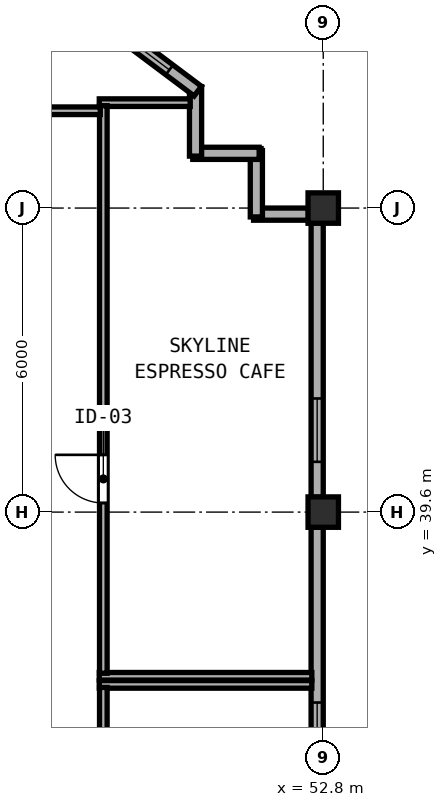
"""IFC4 building model, lengths in metres.
Left out: names, types, materials, properties, quantities, classifications, styles, units other than length and angle.
Written with IfcOpenShell. Run it as: python <this file> out.ifc"""

import sys

from ifc_helpers import new_model, si_unit, direction, frame, frame_2d, origin, origin_2d, place, context, subcontext, project, spatial, rectangle, hollow_rectangle, extrude, element, fill, save


model = new_model("IFC4")
c1 = context("Model", 3, precision=1e-05, world=origin(), true_north=direction((0.0, 1.0)))
c2 = subcontext(c1, "Body", "Model", "MODEL_VIEW")
j1 = project(units=[si_unit("LENGTHUNIT", "METRE"), si_unit("PLANEANGLEUNIT", "RADIAN")], contexts=[c1])
p1 = place(None, origin())
s1 = spatial("IfcSite", under=j1, at=p1, CompositionType="ELEMENT")
p2 = place(p1, origin())
s2 = spatial("IfcBuilding", under=s1, at=p2, CompositionType="ELEMENT")
p3 = place(p2, frame((0.0, 0.0, 318.2)))
s3 = spatial("IfcBuildingStorey", under=s2, at=p3, CompositionType="ELEMENT", Elevation=318.2)
for number, where, z_axis, x_axis in (
    (1, (52.8, 45.6, 0.0), (0.0, 0.0, 1.0), (1.0, 0.0, 0.0)),
    (2, (52.8, 39.6, 0.0), (0.0, 0.0, 1.0), (1.0, 0.0, 0.0)),
):
    element("IfcColumn", number, at=place(p3, frame(where, z_axis=z_axis, x_axis=x_axis)), inside=s3, PredefinedType="COLUMN", context=c2, shape_type="SweptSolid", body=[
        extrude(hollow_rectangle(XDim=0.6, YDim=0.6, WallThickness=0.024, at=origin_2d()), origin(), (0.0, 0.0, 1.0), 5.0),
    ])
p4 = place(p3, frame((52.68, 33.892, 0.0), z_axis=(0.0, 0.0, 1.0), x_axis=(0.0, 1.0, 0.0)))
e3 = element("IfcWall", 3, at=p4, inside=s3, PredefinedType="SOLIDWALL", context=c2, shape_type="SweptSolid", body=[
    extrude(rectangle(XDim=5.416, YDim=0.24, at=frame_2d((2.708, 0.0))), origin(), (0.0, 0.0, 1.0), 4.355),
])
p5 = place(p4, frame((0.7, 0.0, 0.85)))
e4 = element("IfcOpeningElement", 4, at=p5, cuts=e3, PredefinedType="OPENING", context=c2, shape_type="SweptSolid", body=[
    extrude(rectangle(XDim=1.25, YDim=1.95, at=frame_2d((0.625, 0.975))), frame((0.0, 0.13, 0.0), z_axis=(0.0, -1.0, 0.0), x_axis=(1.0, 0.0, 0.0)), (0.0, 0.0, 1.0), 0.26),
])
p6 = place(p3, frame((52.68, 39.892, 0.0), z_axis=(0.0, 0.0, 1.0), x_axis=(0.0, 1.0, 0.0)))
e5 = element("IfcWall", 5, at=p6, inside=s3, PredefinedType="SOLIDWALL", context=c2, shape_type="SweptSolid", body=[
    extrude(rectangle(XDim=5.416, YDim=0.24, at=frame_2d((2.708, 0.0))), origin(), (0.0, 0.0, 1.0), 4.355),
])
p7 = place(p6, frame((0.7, 0.0, 0.85)))
e6 = element("IfcOpeningElement", 6, at=p7, cuts=e5, PredefinedType="OPENING", context=c2, shape_type="SweptSolid", body=[
    extrude(rectangle(XDim=1.25, YDim=1.95, at=frame_2d((0.625, 0.975))), frame((0.0, 0.13, 0.0), z_axis=(0.0, -1.0, 0.0), x_axis=(1.0, 0.0, 0.0)), (0.0, 0.0, 1.0), 0.26),
])
p8 = place(p3, frame((52.508, 45.48, 0.0), z_axis=(0.0, 0.0, 1.0), x_axis=(-1.0, 0.0, 0.0)))
e7 = element("IfcWall", 7, at=p8, inside=s3, PredefinedType="SOLIDWALL", context=c2, shape_type="SweptSolid", body=[
    extrude(rectangle(XDim=1.083, YDim=0.24, at=frame_2d((0.542, 0.0))), origin(), (0.0, 0.0, 1.0), 4.76),
])
p9 = place(p3, frame((51.48, 45.425, 0.0), z_axis=(0.0, 0.0, 1.0), x_axis=(0.0, 1.0, 0.0)))
e8 = element("IfcWall", 8, at=p9, inside=s3, PredefinedType="SOLIDWALL", context=c2, shape_type="SweptSolid", body=[
    extrude(rectangle(XDim=1.31, YDim=0.24, at=frame_2d((0.655, 0.0))), origin(), (0.0, 0.0, 1.0), 4.76),
])
p10 = place(p3, frame((51.535, 46.68, 0.0), z_axis=(0.0, 0.0, 1.0), x_axis=(-1.0, 0.0, 0.0)))
e9 = element("IfcWall", 9, at=p10, inside=s3, PredefinedType="SOLIDWALL", context=c2, shape_type="SweptSolid", body=[
    extrude(rectangle(XDim=1.31, YDim=0.24, at=frame_2d((0.655, 0.0))), origin(), (0.0, 0.0, 1.0), 4.76),
])
p11 = place(p3, frame((50.28, 46.625, 0.0), z_axis=(0.0, 0.0, 1.0), x_axis=(0.0, 1.0, 0.0)))
e10 = element("IfcWall", 10, at=p11, inside=s3, PredefinedType="SOLIDWALL", context=c2, shape_type="SweptSolid", body=[
    extrude(rectangle(XDim=1.37, YDim=0.24, at=frame_2d((0.685, 0.0))), origin(), (0.0, 0.0, 1.0), 4.76),
])
p12 = place(p3, frame((50.324, 47.907, 0.0), z_axis=(0.0, 0.0, 1.0), x_axis=(-0.80001459783, 0.599980535734, 0.0)))
e11 = element("IfcWall", 11, at=p12, inside=s3, PredefinedType="SOLIDWALL", context=c2, shape_type="SweptSolid", body=[
    extrude(rectangle(XDim=6.021, YDim=0.24, at=frame_2d((3.01, 0.0))), origin(), (0.0, 0.0, 1.0), 4.76),
])
p13 = place(p12, frame((0.7, 0.0, 0.85)))
e12 = element("IfcOpeningElement", 12, at=p13, cuts=e11, PredefinedType="OPENING", context=c2, shape_type="SweptSolid", body=[
    extrude(rectangle(XDim=1.25, YDim=1.95, at=frame_2d((0.625, 0.975))), frame((0.0, 0.13, 0.0), z_axis=(0.0, -1.0, 0.0), x_axis=(1.0, 0.0, 0.0)), (0.0, 0.0, 1.0), 0.26),
])
p14 = place(p3, frame((48.38, 36.2, 0.0), z_axis=(0.0, 0.0, 1.0), x_axis=(1.0, 0.0, 0.0)))
e13 = element("IfcWall", 13, at=p14, inside=s3, PredefinedType="PARTITIONING", context=c2, shape_type="SweptSolid", body=[
    extrude(rectangle(XDim=4.195, YDim=0.15, at=frame_2d((2.098, 0.0))), origin(), (0.0, 0.0, 1.0), 4.76),
])
p15 = place(p3, frame((48.46, 26.26, 0.0), z_axis=(0.0, 0.0, 1.0), x_axis=(0.0, 1.0, 0.0)))
e14 = element("IfcWall", 14, at=p15, inside=s3, PredefinedType="PARTITIONING", context=c2, shape_type="SweptSolid", body=[
    extrude(rectangle(XDim=9.88, YDim=0.15, at=frame_2d((4.94, 0.0))), origin(), (0.0, 0.0, 1.0), 4.76),
])
p16 = place(p15, frame((3.31, 0.0, 0.0)))
e15 = element("IfcOpeningElement", 15, at=p16, cuts=e14, PredefinedType="OPENING", context=c2, shape_type="SweptSolid", body=[
    extrude(rectangle(XDim=0.95, YDim=2.12, at=frame_2d((0.475, 1.06))), frame((0.0, 0.085, 0.0), z_axis=(0.0, -1.0, 0.0), x_axis=(1.0, 0.0, 0.0)), (0.0, 0.0, 1.0), 0.17),
])
p17 = place(p3, frame((48.38, 47.68, 0.0), z_axis=(0.0, 0.0, 1.0), x_axis=(1.0, 0.0, 0.0)))
e16 = element("IfcWall", 16, at=p17, inside=s3, PredefinedType="PARTITIONING", context=c2, shape_type="SweptSolid", body=[
    extrude(rectangle(XDim=1.795, YDim=0.15, at=frame_2d((0.897, 0.0))), origin(), (0.0, 0.0, 1.0), 4.76),
])
p18 = place(p3, frame((48.38, 36.36, 0.0), z_axis=(0.0, 0.0, 1.0), x_axis=(1.0, 0.0, 0.0)))
e17 = element("IfcWall", 17, at=p18, inside=s3, PredefinedType="PARTITIONING", context=c2, shape_type="SweptSolid", body=[
    extrude(rectangle(XDim=4.195, YDim=0.15, at=frame_2d((2.098, 0.0))), origin(), (0.0, 0.0, 1.0), 4.76),
])
p19 = place(p3, frame((48.46, 36.42, 0.0), z_axis=(0.0, 0.0, 1.0), x_axis=(0.0, 1.0, 0.0)))
e18 = element("IfcWall", 18, at=p19, inside=s3, PredefinedType="PARTITIONING", context=c2, shape_type="SweptSolid", body=[
    extrude(rectangle(XDim=11.2, YDim=0.15, at=frame_2d((5.6, 0.0))), origin(), (0.0, 0.0, 1.0), 4.76),
])
p20 = place(p19, frame((3.36, 0.0, 0.0)))
e19 = element("IfcOpeningElement", 19, at=p20, cuts=e18, PredefinedType="OPENING", context=c2, shape_type="SweptSolid", body=[
    extrude(rectangle(XDim=0.95, YDim=2.12, at=frame_2d((0.475, 1.06))), frame((0.0, 0.085, 0.0), z_axis=(0.0, -1.0, 0.0), x_axis=(1.0, 0.0, 0.0)), (0.0, 0.0, 1.0), 0.17),
])
p21 = place(p3, frame((43.432, 47.52, 0.0), z_axis=(0.0, 0.0, 1.0), x_axis=(1.0, 0.0, 0.0)))
e20 = element("IfcWall", 20, at=p21, inside=s3, PredefinedType="PARTITIONING", context=c2, shape_type="SweptSolid", body=[
    extrude(rectangle(XDim=4.968, YDim=0.15, at=frame_2d((2.484, 0.0))), origin(), (0.0, 0.0, 1.0), 4.76),
])
p22 = place(p21, frame((0.748, 0.0, 0.0)))
e21 = element("IfcOpeningElement", 21, at=p22, cuts=e20, PredefinedType="OPENING", context=c2, shape_type="SweptSolid", body=[
    extrude(rectangle(XDim=0.95, YDim=2.12, at=frame_2d((0.475, 1.06))), frame((0.0, 0.085, 0.0), z_axis=(0.0, -1.0, 0.0), x_axis=(1.0, 0.0, 0.0)), (0.0, 0.0, 1.0), 0.17),
])
p23 = place(p5, origin())
e22 = element("IfcWindow", 22, at=p23, inside=s3, PartitioningType="SINGLE_PANEL", PredefinedType="WINDOW", context=c2, shape_type="SweptSolid", body=[
    extrude(rectangle(XDim=1.25, YDim=1.95, at=frame_2d((0.625, 0.975))), frame((0.0, 0.03, 0.0), z_axis=(0.0, -1.0, 0.0), x_axis=(1.0, 0.0, 0.0)), (0.0, 0.0, 1.0), 0.06),
])
fill(e4, e22)
p24 = place(p7, origin())
e23 = element("IfcWindow", 23, at=p24, inside=s3, PartitioningType="SINGLE_PANEL", PredefinedType="WINDOW", context=c2, shape_type="SweptSolid", body=[
    extrude(rectangle(XDim=1.25, YDim=1.95, at=frame_2d((0.625, 0.975))), frame((0.0, 0.03, 0.0), z_axis=(0.0, -1.0, 0.0), x_axis=(1.0, 0.0, 0.0)), (0.0, 0.0, 1.0), 0.06),
])
fill(e6, e23)
p25 = place(p13, origin())
e24 = element("IfcWindow", 24, at=p25, inside=s3, PartitioningType="SINGLE_PANEL", PredefinedType="WINDOW", context=c2, shape_type="SweptSolid", body=[
    extrude(rectangle(XDim=1.25, YDim=1.95, at=frame_2d((0.625, 0.975))), frame((0.0, 0.03, 0.0), z_axis=(0.0, -1.0, 0.0), x_axis=(1.0, 0.0, 0.0)), (0.0, 0.0, 1.0), 0.06),
])
fill(e12, e24)
p26 = place(p20, origin())
e25 = element("IfcDoor", 25, at=p26, inside=s3, OperationType="SINGLE_SWING_RIGHT", PredefinedType="DOOR", context=c2, shape_type="SweptSolid", body=[
    extrude(rectangle(XDim=0.95, YDim=2.12, at=frame_2d((0.475, 1.06))), frame((0.0, 0.025, 0.0), z_axis=(0.0, -1.0, 0.0), x_axis=(1.0, 0.0, 0.0)), (0.0, 0.0, 1.0), 0.05),
])
fill(e19, e25)
save(model, sys.argv[1])
